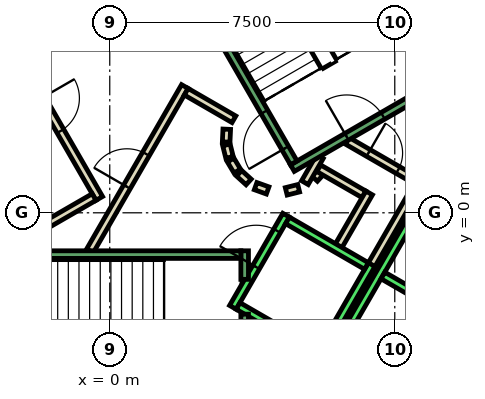
"""IFC4 building model, lengths in metres.
Left out: names, types, materials, properties, quantities, classifications, styles, units other than length and angle.
Written with IfcOpenShell. Run it as: python <this file> out.ifc"""

import sys

from ifc_helpers import new_model, si_unit, direction, frame, frame_2d, origin, place, context, subcontext, project, spatial, polyline, rectangle, outline, extrude, element, fill, save


model = new_model("IFC4")
c1 = context("Model", 3, precision=1e-05, world=origin(), true_north=direction((0.0, 1.0)))
c2 = subcontext(c1, "Body", "Model", "MODEL_VIEW")
j1 = project(units=[si_unit("LENGTHUNIT", "METRE"), si_unit("PLANEANGLEUNIT", "RADIAN")], contexts=[c1])
p1 = place(None, origin())
s1 = spatial("IfcSite", under=j1, at=p1, CompositionType="ELEMENT")
p2 = place(p1, origin())
s2 = spatial("IfcBuilding", under=s1, at=p2, CompositionType="ELEMENT")
p3 = place(p2, frame((0.0, 0.0, 86.6)))
s3 = spatial("IfcBuildingStorey", under=s2, at=p3, CompositionType="ELEMENT", Elevation=86.6)
p4 = place(p3, frame((0.0, 0.0, -0.6)))
e1 = element("IfcWall", 1, at=p4, inside=s3, PredefinedType="SHEAR", context=c2, shape_type="SweptSolid", body=[
    extrude(outline(polyline([(8.517, 11.748), (7.738, 11.298), (12.817, 2.5), (13.856, 2.5), (8.517, 11.748)])), origin(), (0.0, 0.0, 1.0), 4.4),
])
p5 = place(p3, frame((5.39, 0.898, 0.0), z_axis=(0.0, 0.0, 1.0), x_axis=(0.673828488714, 0.738887791073, 0.0)))
e2 = element("IfcWall", 2, at=p5, inside=s3, PredefinedType="PARTITIONING", context=c2, shape_type="SweptSolid", body=[
    extrude(rectangle(XDim=0.263, YDim=0.2, at=frame_2d((0.131, 0.0))), origin(), (0.0, 0.0, 1.0), 3.8),
])
p6 = place(p3, frame((5.499, 1.172, 0.0), z_axis=(0.0, 0.0, 1.0), x_axis=(0.866333505267, -0.499465972466, 0.0)))
e3 = element("IfcWall", 3, at=p6, inside=s3, PredefinedType="PARTITIONING", context=c2, shape_type="SweptSolid", body=[
    extrude(rectangle(XDim=1.374, YDim=0.2, at=frame_2d((0.687, 0.0))), origin(), (0.0, 0.0, 1.0), 3.8),
])
p7 = place(p3, frame((6.826, 0.522, 0.0), z_axis=(0.0, 0.0, 1.0), x_axis=(-0.500016722714, -0.866015748706, 0.0)))
e4 = element("IfcWall", 4, at=p7, inside=s3, PredefinedType="PARTITIONING", context=c2, shape_type="SweptSolid", body=[
    extrude(rectangle(XDim=1.7, YDim=0.2, at=frame_2d((0.85, 0.0))), origin(), (0.0, 0.0, 1.0), 3.8),
])
p8 = place(p3, frame((6.25, 1.894, 0.0), z_axis=(0.0, 0.0, 1.0), x_axis=(0.866043184279, -0.499969202016, 0.0)))
e5 = element("IfcWall", 5, at=p8, inside=s3, PredefinedType="PARTITIONING", context=c2, shape_type="SweptSolid", body=[
    extrude(rectangle(XDim=2.084, YDim=0.2, at=frame_2d((1.042, 0.0))), origin(), (0.0, 0.0, 1.0), 3.8),
])
p9 = place(p8, frame((0.642, 0.0, 0.0)))
e6 = element("IfcOpeningElement", 6, at=p9, cuts=e5, PredefinedType="OPENING", context=c2, shape_type="SweptSolid", body=[
    extrude(rectangle(XDim=0.9, YDim=2.1, at=frame_2d((0.45, 1.05))), frame((0.0, 0.11, 0.0), z_axis=(0.0, -1.0, 0.0), x_axis=(1.0, 0.0, 0.0)), (0.0, 0.0, 1.0), 0.22),
])
p10 = place(p3, frame((8.192, 0.888, 0.0), z_axis=(0.0, 0.0, 1.0), x_axis=(-0.499940625693, -0.866059680843, 0.0)))
e7 = element("IfcWall", 7, at=p10, inside=s3, PredefinedType="PARTITIONING", context=c2, shape_type="SweptSolid", body=[
    extrude(rectangle(XDim=2.68, YDim=0.2, at=frame_2d((1.34, 0.0))), origin(), (0.0, 0.0, 1.0), 3.8),
])
p11 = place(p3, frame((5.135, 0.793, 0.0), z_axis=(0.0, 0.0, 1.0), x_axis=(0.499526442893, 0.866298639529, 0.0)))
e8 = element("IfcWall", 8, at=p11, inside=s3, PredefinedType="PARTITIONING", context=c2, shape_type="SweptSolid", body=[
    extrude(rectangle(XDim=0.791, YDim=0.2, at=frame_2d((0.396, 0.0))), origin(), (0.0, 0.0, 1.0), 3.8),
])
p12 = place(p3, frame((-0.52, -1.0, 0.0), z_axis=(0.0, 0.0, 1.0), x_axis=(0.50011622646, 0.865958290007, 0.0)))
e9 = element("IfcWall", 9, at=p12, inside=s3, PredefinedType="PARTITIONING", context=c2, shape_type="SweptSolid", body=[
    extrude(rectangle(XDim=4.991, YDim=0.2, at=frame_2d((2.496, 0.0))), origin(), (0.0, 0.0, 1.0), 3.8),
])
p13 = place(p12, frame((1.945, 0.0, 0.0)))
e10 = element("IfcOpeningElement", 10, at=p13, cuts=e9, PredefinedType="OPENING", context=c2, shape_type="SweptSolid", body=[
    extrude(rectangle(XDim=1.0, YDim=2.1, at=frame_2d((0.5, 1.05))), frame((0.0, 0.11, 0.0), z_axis=(0.0, -1.0, 0.0), x_axis=(1.0, 0.0, 0.0)), (0.0, 0.0, 1.0), 0.22),
])
p14 = place(p3, frame((2.012, 3.186, 0.0), z_axis=(0.0, 0.0, 1.0), x_axis=(0.865891012941, -0.500232699559, 0.0)))
e11 = element("IfcWall", 11, at=p14, inside=s3, PredefinedType="PARTITIONING", context=c2, shape_type="SweptSolid", body=[
    extrude(rectangle(XDim=1.449, YDim=0.2, at=frame_2d((0.725, 0.0))), origin(), (0.0, 0.0, 1.0), 3.8),
])
p15 = place(p3, frame((3.079, 2.199, 0.0), z_axis=(0.0, 0.0, 1.0), x_axis=(-0.047771483479, -0.998858290933, 0.0)))
e12 = element("IfcWall", 12, at=p15, inside=s3, PredefinedType="PARTITIONING", context=c2, shape_type="SweptSolid", body=[
    extrude(rectangle(XDim=0.337, YDim=0.2, at=frame_2d((0.169, 0.0))), origin(), (0.0, 0.0, 1.0), 3.8),
])
p16 = place(p3, frame((3.07, 1.786, 0.0), z_axis=(0.0, 0.0, 1.0), x_axis=(0.242705583207, -0.970099994784, 0.0)))
e13 = element("IfcWall", 13, at=p16, inside=s3, PredefinedType="PARTITIONING", context=c2, shape_type="SweptSolid", body=[
    extrude(rectangle(XDim=0.338, YDim=0.2, at=frame_2d((0.169, 0.0))), origin(), (0.0, 0.0, 1.0), 3.8),
])
for number, where, z_axis, x_axis in (
    (14, (3.182, 1.388, 0.0), (0.0, 0.0, 1.0), (0.512, -0.859, 0.0)),
    (15, (3.404, 1.039, 0.0), (0.0, 0.0, 1.0), (0.74, -0.672, 0.0)),
):
    element("IfcWall", number, at=place(p3, frame(where, z_axis=z_axis, x_axis=x_axis)), inside=s3, PredefinedType="PARTITIONING", context=c2, shape_type="SweptSolid", body=[
        extrude(rectangle(XDim=0.338, YDim=0.2, at=frame_2d((0.169, 0.0))), origin(), (0.0, 0.0, 1.0), 3.8),
    ])
p17 = place(p3, frame((3.838, 0.702, 0.0), z_axis=(0.0, 0.0, 1.0), x_axis=(0.941035081519, -0.338308993895, 0.0)))
e16 = element("IfcWall", 16, at=p17, inside=s3, PredefinedType="PARTITIONING", context=c2, shape_type="SweptSolid", body=[
    extrude(rectangle(XDim=0.337, YDim=0.2, at=frame_2d((0.168, 0.0))), origin(), (0.0, 0.0, 1.0), 3.8),
])
p18 = place(p3, frame((4.644, 0.564, 0.0), z_axis=(0.0, 0.0, 1.0), x_axis=(0.969929076366, 0.243387729394, 0.0)))
e17 = element("IfcWall", 17, at=p18, inside=s3, PredefinedType="PARTITIONING", context=c2, shape_type="SweptSolid", body=[
    extrude(rectangle(XDim=0.337, YDim=0.2, at=frame_2d((0.168, 0.0))), origin(), (0.0, 0.0, 1.0), 3.8),
])
p19 = place(p3, frame((-2.771, 4.7, 0.0), z_axis=(0.0, 0.0, 1.0), x_axis=(0.499969479948, -0.866043023828, 0.0)))
e18 = element("IfcWall", 18, at=p19, inside=s3, PredefinedType="PARTITIONING", context=c2, shape_type="SweptSolid", body=[
    extrude(rectangle(XDim=4.99, YDim=0.2, at=frame_2d((2.495, 0.0))), origin(), (0.0, 0.0, 1.0), 3.8),
])
p20 = place(p19, frame((1.945, 0.0, 0.0)))
e19 = element("IfcOpeningElement", 19, at=p20, cuts=e18, PredefinedType="OPENING", context=c2, shape_type="SweptSolid", body=[
    extrude(rectangle(XDim=1.0, YDim=2.1, at=frame_2d((0.5, 1.05))), frame((0.0, 0.11, 0.0), z_axis=(0.0, -1.0, 0.0), x_axis=(1.0, 0.0, 0.0)), (0.0, 0.0, 1.0), 0.22),
])
p21 = place(p3, frame((-0.412, 0.414, 0.0), z_axis=(0.0, 0.0, 1.0), x_axis=(-0.866017369001, -0.500013916395, 0.0)))
e20 = element("IfcWall", 20, at=p21, inside=s3, PredefinedType="PARTITIONING", context=c2, shape_type="SweptSolid", body=[
    extrude(rectangle(XDim=1.45, YDim=0.2, at=frame_2d((0.725, 0.0))), origin(), (0.0, 0.0, 1.0), 3.8),
])
p22 = place(p3, frame((3.24, -2.488, 0.0), z_axis=(0.0, 0.0, 1.0), x_axis=(0.49994636267, 0.866056369097, 0.0)))
e21 = element("IfcWall", 21, at=p22, inside=s3, PredefinedType="STANDARD", context=c2, shape_type="SweptSolid", body=[
    extrude(rectangle(XDim=2.8, YDim=0.2, at=frame_2d((1.4, 0.0))), origin(), (0.0, 0.0, 1.0), 3.8),
])
p23 = place(p22, frame((1.225, 0.0, 0.0)))
e22 = element("IfcOpeningElement", 22, at=p23, cuts=e21, PredefinedType="OPENING", context=c2, shape_type="SweptSolid", body=[
    extrude(rectangle(XDim=1.1, YDim=2.1, at=frame_2d((0.55, 1.05))), frame((0.0, 0.11, 0.0), z_axis=(0.0, -1.0, 0.0), x_axis=(1.0, 0.0, 0.0)), (0.0, 0.0, 1.0), 0.22),
])
p24 = place(p3, frame((5.492, -3.788, 0.0), z_axis=(0.0, 0.0, 1.0), x_axis=(0.500011755427, 0.866018616679, 0.0)))
e23 = element("IfcWall", 23, at=p24, inside=s3, PredefinedType="STANDARD", context=c2, shape_type="SweptSolid", body=[
    extrude(rectangle(XDim=2.8, YDim=0.2, at=frame_2d((1.4, 0.0))), origin(), (0.0, 0.0, 1.0), 3.8),
])
p25 = place(p3, frame((3.377, -2.452, 0.0), z_axis=(0.0, 0.0, 1.0), x_axis=(0.865955154139, -0.50012165622, 0.0)))
e24 = element("IfcWall", 24, at=p25, inside=s3, PredefinedType="STANDARD", context=c2, shape_type="SweptSolid", body=[
    extrude(rectangle(XDim=2.4, YDim=0.2, at=frame_2d((1.2, 0.0))), origin(), (0.0, 0.0, 1.0), 3.8),
])
p26 = place(p3, frame((4.677, -0.2, 0.0), z_axis=(0.0, 0.0, 1.0), x_axis=(0.865973769406, -0.500089422704, 0.0)))
e25 = element("IfcWall", 25, at=p26, inside=s3, PredefinedType="STANDARD", context=c2, shape_type="SweptSolid", body=[
    extrude(rectangle(XDim=2.399, YDim=0.2, at=frame_2d((1.2, 0.0))), origin(), (0.0, 0.0, 1.0), 3.8),
])
p27 = place(p3, frame((4.451, -6.19, 0.0), z_axis=(0.0, 0.0, 1.0), x_axis=(0.50000090737, 0.866024879913, 0.0)))
e26 = element("IfcWall", 26, at=p27, inside=s3, PredefinedType="STANDARD", context=c2, shape_type="SweptSolid", body=[
    extrude(rectangle(XDim=10.6, YDim=0.2, at=frame_2d((5.3, 0.0))), origin(), (0.0, 0.0, 1.0), 3.8),
])
p28 = place(p3, frame((7.188, -1.65, 0.0), z_axis=(0.0, 0.0, 1.0), x_axis=(0.866022959057, -0.500004234368, 0.0)))
e27 = element("IfcWall", 27, at=p28, inside=s3, PredefinedType="STANDARD", context=c2, shape_type="SweptSolid", body=[
    extrude(rectangle(XDim=2.5, YDim=0.2, at=frame_2d((1.25, 0.0))), origin(), (0.0, 0.0, 1.0), 3.8),
])
p29 = place(p3, frame((3.55, -2.667, 0.0), z_axis=(0.0, 0.0, 1.0), x_axis=(0.0, -1.0, 0.0)))
e28 = element("IfcWall", 28, at=p29, inside=s3, PredefinedType="STANDARD", context=c2, shape_type="SweptSolid", body=[
    extrude(rectangle(XDim=2.733, YDim=0.2, at=frame_2d((1.366, 0.0))), origin(), (0.0, 0.0, 1.0), 3.8),
])
p30 = place(p3, frame((3.55, -1.0, 0.0), z_axis=(0.0, 0.0, 1.0), x_axis=(0.0, -1.0, 0.0)))
e29 = element("IfcWall", 29, at=p30, inside=s3, PredefinedType="STANDARD", context=c2, shape_type="SweptSolid", body=[
    extrude(rectangle(XDim=0.751, YDim=0.2, at=frame_2d((0.375, 0.0))), origin(), (0.0, 0.0, 1.0), 3.8),
])
p31 = place(p3, frame((-3.45, -1.1, 0.0), z_axis=(0.0, 0.0, 1.0), x_axis=(1.0, 0.0, 0.0)))
e30 = element("IfcWall", 30, at=p31, inside=s3, PredefinedType="STANDARD", context=c2, shape_type="SweptSolid", body=[
    extrude(rectangle(XDim=6.9, YDim=0.2, at=frame_2d((3.45, 0.0))), origin(), (0.0, 0.0, 1.0), 3.8),
])
p32 = place(p31, frame((0.45, 0.0, 0.0)))
e31 = element("IfcOpeningElement", 31, at=p32, cuts=e30, PredefinedType="OPENING", context=c2, shape_type="SweptSolid", body=[
    extrude(rectangle(XDim=1.1, YDim=2.2, at=frame_2d((0.55, 1.1))), frame((0.0, 0.11, 0.0), z_axis=(0.0, -1.0, 0.0), x_axis=(1.0, 0.0, 0.0)), (0.0, 0.0, 1.0), 0.22),
])
p33 = place(p3, frame((4.806, 1.176, 0.0), z_axis=(0.0, 0.0, 1.0), x_axis=(0.866059941101, 0.499940174841, 0.0)))
e32 = element("IfcWall", 32, at=p33, inside=s3, PredefinedType="STANDARD", context=c2, shape_type="SweptSolid", body=[
    extrude(rectangle(XDim=4.4, YDim=0.2, at=frame_2d((2.2, 0.0))), origin(), (0.0, 0.0, 1.0), 3.8),
])
p34 = place(p33, frame((1.65, 0.0, 0.0)))
e33 = element("IfcOpeningElement", 33, at=p34, cuts=e32, PredefinedType="OPENING", context=c2, shape_type="SweptSolid", body=[
    extrude(rectangle(XDim=1.1, YDim=2.2, at=frame_2d((0.55, 1.1))), frame((0.0, 0.11, 0.0), z_axis=(0.0, -1.0, 0.0), x_axis=(1.0, 0.0, 0.0)), (0.0, 0.0, 1.0), 0.22),
])
p35 = place(p3, frame((4.843, 1.312, 0.0), z_axis=(0.0, 0.0, 1.0), x_axis=(-0.499963383562, 0.866046543262, 0.0)))
e34 = element("IfcWall", 34, at=p35, inside=s3, PredefinedType="STANDARD", context=c2, shape_type="SweptSolid", body=[
    extrude(rectangle(XDim=6.9, YDim=0.2, at=frame_2d((3.45, 0.0))), origin(), (0.0, 0.0, 1.0), 3.8),
])
p36 = place(p35, frame((0.45, 0.0, 0.0)))
e35 = element("IfcOpeningElement", 35, at=p36, cuts=e34, PredefinedType="OPENING", context=c2, shape_type="SweptSolid", body=[
    extrude(rectangle(XDim=1.1, YDim=2.2, at=frame_2d((0.55, 1.1))), frame((0.0, 0.11, 0.0), z_axis=(0.0, -1.0, 0.0), x_axis=(1.0, 0.0, 0.0)), (0.0, 0.0, 1.0), 0.22),
])
p37 = place(p3, frame((8.48, 3.412, 0.0), z_axis=(0.0, 0.0, 1.0), x_axis=(-0.499978703459, 0.866037698999, 0.0)))
e36 = element("IfcWall", 36, at=p37, inside=s3, PredefinedType="STANDARD", context=c2, shape_type="SweptSolid", body=[
    extrude(rectangle(XDim=6.9, YDim=0.2, at=frame_2d((3.45, 0.0))), origin(), (0.0, 0.0, 1.0), 3.8),
])
p38 = place(p3, frame((-1.393, 7.288, 0.0), z_axis=(0.0, 0.0, 1.0), x_axis=(-0.499963383562, -0.866046543262, 0.0)))
e37 = element("IfcWall", 37, at=p38, inside=s3, PredefinedType="STANDARD", context=c2, shape_type="SweptSolid", body=[
    extrude(rectangle(XDim=6.9, YDim=0.2, at=frame_2d((3.45, 0.0))), origin(), (0.0, 0.0, 1.0), 3.8),
])
p39 = place(p38, frame((0.45, 0.0, 0.0)))
e38 = element("IfcOpeningElement", 38, at=p39, cuts=e37, PredefinedType="OPENING", context=c2, shape_type="SweptSolid", body=[
    extrude(rectangle(XDim=1.1, YDim=2.2, at=frame_2d((0.55, 1.1))), frame((0.0, 0.11, 0.0), z_axis=(0.0, -1.0, 0.0), x_axis=(1.0, 0.0, 0.0)), (0.0, 0.0, 1.0), 0.22),
])
p40 = place(p13, origin())
e39 = element("IfcDoor", 39, at=p40, inside=s3, OperationType="SINGLE_SWING_LEFT", PredefinedType="DOOR", context=c2, shape_type="SweptSolid", body=[
    extrude(rectangle(XDim=1.0, YDim=2.1, at=frame_2d((0.5, 1.05))), frame((0.0, 0.025, 0.0), z_axis=(0.0, -1.0, 0.0), x_axis=(1.0, 0.0, 0.0)), (0.0, 0.0, 1.0), 0.05),
])
fill(e10, e39)
p41 = place(p20, origin())
e40 = element("IfcDoor", 40, at=p41, inside=s3, OperationType="SINGLE_SWING_RIGHT", PredefinedType="DOOR", context=c2, shape_type="SweptSolid", body=[
    extrude(rectangle(XDim=1.0, YDim=2.1, at=frame_2d((0.5, 1.05))), frame((0.0, 0.025, 0.0), z_axis=(0.0, -1.0, 0.0), x_axis=(1.0, 0.0, 0.0)), (0.0, 0.0, 1.0), 0.05),
])
fill(e19, e40)
p42 = place(p9, origin())
e41 = element("IfcDoor", 41, at=p42, inside=s3, OperationType="SINGLE_SWING_LEFT", PredefinedType="DOOR", context=c2, shape_type="SweptSolid", body=[
    extrude(rectangle(XDim=0.9, YDim=2.1, at=frame_2d((0.45, 1.05))), frame((0.0, 0.025, 0.0), z_axis=(0.0, -1.0, 0.0), x_axis=(1.0, 0.0, 0.0)), (0.0, 0.0, 1.0), 0.05),
])
fill(e6, e41)
p43 = place(p23, origin())
e42 = element("IfcDoor", 42, at=p43, inside=s3, OperationType="SLIDING_TO_LEFT", PredefinedType="DOOR", context=c2, shape_type="SweptSolid", body=[
    extrude(rectangle(XDim=1.1, YDim=2.1, at=frame_2d((0.55, 1.05))), frame((0.0, 0.025, 0.0), z_axis=(0.0, -1.0, 0.0), x_axis=(1.0, 0.0, 0.0)), (0.0, 0.0, 1.0), 0.05),
])
fill(e22, e42)
p44 = place(p36, origin())
e43 = element("IfcDoor", 43, at=p44, inside=s3, OperationType="SINGLE_SWING_LEFT", PredefinedType="DOOR", context=c2, shape_type="SweptSolid", body=[
    extrude(rectangle(XDim=1.1, YDim=2.2, at=frame_2d((0.55, 1.1))), frame((0.0, 0.025, 0.0), z_axis=(0.0, -1.0, 0.0), x_axis=(1.0, 0.0, 0.0)), (0.0, 0.0, 1.0), 0.05),
])
fill(e35, e43)
p45 = place(p34, origin())
e44 = element("IfcDoor", 44, at=p45, inside=s3, OperationType="SINGLE_SWING_LEFT", PredefinedType="DOOR", context=c2, shape_type="SweptSolid", body=[
    extrude(rectangle(XDim=1.1, YDim=2.2, at=frame_2d((0.55, 1.1))), frame((0.0, 0.025, 0.0), z_axis=(0.0, -1.0, 0.0), x_axis=(1.0, 0.0, 0.0)), (0.0, 0.0, 1.0), 0.05),
])
fill(e33, e44)
save(model, sys.argv[1])
